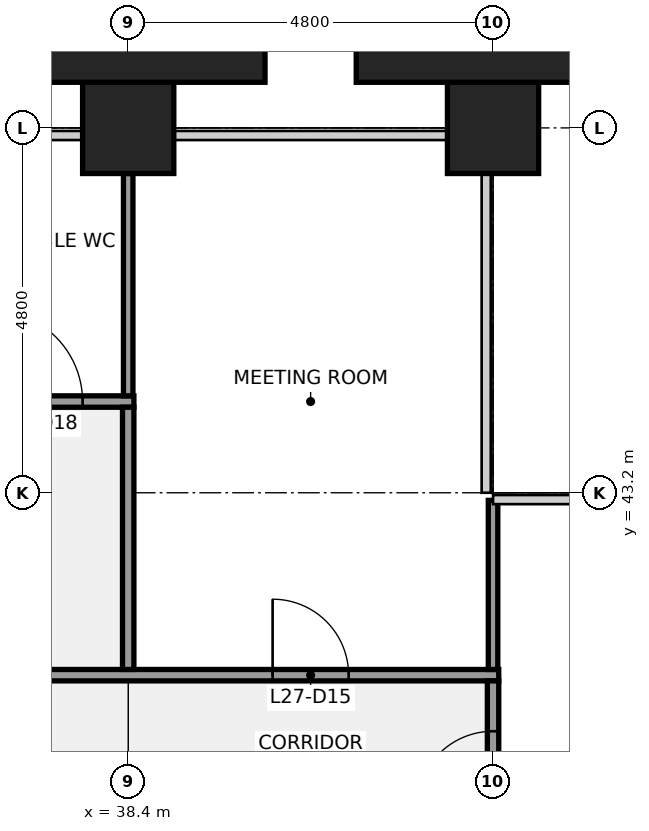
"""IFC4 building model, lengths in metres.
Left out: names, types, materials, properties, quantities, classifications, styles, units other than length and angle.
Written with IfcOpenShell. Run it as: python <this file> out.ifc"""

import sys

from ifc_helpers import new_model, si_unit, direction, frame, frame_2d, origin, origin_2d, place, context, subcontext, project, spatial, rectangle, extrude, element, fill, save


model = new_model("IFC4")
c1 = context("Model", 3, precision=1e-05, world=origin(), true_north=direction((0.0, 1.0)))
c2 = subcontext(c1, "Body", "Model", "MODEL_VIEW")
j1 = project(units=[si_unit("LENGTHUNIT", "METRE"), si_unit("PLANEANGLEUNIT", "RADIAN")], contexts=[c1])
p1 = place(None, origin())
s1 = spatial("IfcSite", under=j1, at=p1, CompositionType="ELEMENT")
p2 = place(p1, origin())
s2 = spatial("IfcBuilding", under=s1, at=p2, CompositionType="ELEMENT")
p3 = place(p2, frame((0.0, 0.0, 128.1)))
s3 = spatial("IfcBuildingStorey", under=s2, at=p3, CompositionType="ELEMENT", Elevation=128.1)
for number, where, z_axis, x_axis in (
    (1, (38.4, 48.0, 0.0), (0.0, 0.0, 1.0), (1.0, 0.0, 0.0)),
    (2, (43.2, 48.0, 0.0), (0.0, 0.0, 1.0), (1.0, 0.0, 0.0)),
):
    element("IfcColumn", number, at=place(p3, frame(where, z_axis=z_axis, x_axis=x_axis)), inside=s3, PredefinedType="COLUMN", context=c2, shape_type="SweptSolid", body=[
        extrude(rectangle(XDim=1.2, YDim=1.2, at=origin_2d()), origin(), (0.0, 0.0, 1.0), 4.0),
    ])
p4 = place(p3, frame((14.325, 40.8, 0.0), z_axis=(0.0, 0.0, 1.0), x_axis=(1.0, 0.0, 0.0)))
e3 = element("IfcWall", 3, at=p4, inside=s3, PredefinedType="PARTITIONING", context=c2, shape_type="SweptSolid", body=[
    extrude(rectangle(XDim=28.95, YDim=0.15, at=frame_2d((14.475, 0.0))), origin(), (0.0, 0.0, 1.0), 2.936),
])
p5 = place(p4, frame((1.975, 0.0, 0.0)))
e4 = element("IfcOpeningElement", 4, at=p5, cuts=e3, PredefinedType="OPENING", context=c2, shape_type="SweptSolid", body=[
    extrude(rectangle(XDim=1.0, YDim=2.1, at=frame_2d((0.5, 1.05))), frame((0.0, 0.085, 0.0), z_axis=(0.0, -1.0, 0.0), x_axis=(1.0, 0.0, 0.0)), (0.0, 0.0, 1.0), 0.17),
])
p6 = place(p4, frame((5.575, 0.0, 0.0)))
e5 = element("IfcOpeningElement", 5, at=p6, cuts=e3, PredefinedType="OPENING", context=c2, shape_type="SweptSolid", body=[
    extrude(rectangle(XDim=1.0, YDim=2.1, at=frame_2d((0.5, 1.05))), frame((0.0, 0.085, 0.0), z_axis=(0.0, -1.0, 0.0), x_axis=(1.0, 0.0, 0.0)), (0.0, 0.0, 1.0), 0.17),
])
p7 = place(p4, frame((9.175, 0.0, 0.0)))
e6 = element("IfcOpeningElement", 6, at=p7, cuts=e3, PredefinedType="OPENING", context=c2, shape_type="SweptSolid", body=[
    extrude(rectangle(XDim=1.0, YDim=2.1, at=frame_2d((0.5, 1.05))), frame((0.0, 0.085, 0.0), z_axis=(0.0, -1.0, 0.0), x_axis=(1.0, 0.0, 0.0)), (0.0, 0.0, 1.0), 0.17),
])
p8 = place(p4, frame((12.775, 0.0, 0.0)))
e7 = element("IfcOpeningElement", 7, at=p8, cuts=e3, PredefinedType="OPENING", context=c2, shape_type="SweptSolid", body=[
    extrude(rectangle(XDim=1.0, YDim=2.1, at=frame_2d((0.5, 1.05))), frame((0.0, 0.085, 0.0), z_axis=(0.0, -1.0, 0.0), x_axis=(1.0, 0.0, 0.0)), (0.0, 0.0, 1.0), 0.17),
])
p9 = place(p4, frame((15.175, 0.0, 0.0)))
e8 = element("IfcOpeningElement", 8, at=p9, cuts=e3, PredefinedType="OPENING", context=c2, shape_type="SweptSolid", body=[
    extrude(rectangle(XDim=1.0, YDim=2.1, at=frame_2d((0.5, 1.05))), frame((0.0, 0.085, 0.0), z_axis=(0.0, -1.0, 0.0), x_axis=(1.0, 0.0, 0.0)), (0.0, 0.0, 1.0), 0.17),
])
p10 = place(p4, frame((19.975, 0.0, 0.0)))
e9 = element("IfcOpeningElement", 9, at=p10, cuts=e3, PredefinedType="OPENING", context=c2, shape_type="SweptSolid", body=[
    extrude(rectangle(XDim=1.0, YDim=2.1, at=frame_2d((0.5, 1.05))), frame((0.0, 0.085, 0.0), z_axis=(0.0, -1.0, 0.0), x_axis=(1.0, 0.0, 0.0)), (0.0, 0.0, 1.0), 0.17),
])
p11 = place(p4, frame((25.975, 0.0, 0.0)))
e10 = element("IfcOpeningElement", 10, at=p11, cuts=e3, PredefinedType="OPENING", context=c2, shape_type="SweptSolid", body=[
    extrude(rectangle(XDim=1.0, YDim=2.1, at=frame_2d((0.5, 1.05))), frame((0.0, 0.085, 0.0), z_axis=(0.0, -1.0, 0.0), x_axis=(1.0, 0.0, 0.0)), (0.0, 0.0, 1.0), 0.17),
])
p12 = place(p3, frame((31.125, 44.4, 0.0), z_axis=(0.0, 0.0, 1.0), x_axis=(1.0, 0.0, 0.0)))
e11 = element("IfcWall", 11, at=p12, inside=s3, PredefinedType="PARTITIONING", context=c2, shape_type="SweptSolid", body=[
    extrude(rectangle(XDim=7.35, YDim=0.15, at=frame_2d((3.675, 0.0))), origin(), (0.0, 0.0, 1.0), 2.936),
])
p13 = place(p12, frame((0.825, 0.0, 0.0)))
e12 = element("IfcOpeningElement", 12, at=p13, cuts=e11, PredefinedType="OPENING", context=c2, shape_type="SweptSolid", body=[
    extrude(rectangle(XDim=0.9, YDim=2.1, at=frame_2d((0.45, 1.05))), frame((0.0, 0.085, 0.0), z_axis=(0.0, -1.0, 0.0), x_axis=(1.0, 0.0, 0.0)), (0.0, 0.0, 1.0), 0.17),
])
p14 = place(p12, frame((3.225, 0.0, 0.0)))
e13 = element("IfcOpeningElement", 13, at=p14, cuts=e11, PredefinedType="OPENING", context=c2, shape_type="SweptSolid", body=[
    extrude(rectangle(XDim=0.9, YDim=2.1, at=frame_2d((0.45, 1.05))), frame((0.0, 0.085, 0.0), z_axis=(0.0, -1.0, 0.0), x_axis=(1.0, 0.0, 0.0)), (0.0, 0.0, 1.0), 0.17),
])
p15 = place(p12, frame((5.475, 0.0, 0.0)))
e14 = element("IfcOpeningElement", 14, at=p15, cuts=e11, PredefinedType="OPENING", context=c2, shape_type="SweptSolid", body=[
    extrude(rectangle(XDim=1.2, YDim=2.1, at=frame_2d((0.6, 1.05))), frame((0.0, 0.085, 0.0), z_axis=(0.0, -1.0, 0.0), x_axis=(1.0, 0.0, 0.0)), (0.0, 0.0, 1.0), 0.17),
])
p16 = place(p3, frame((38.4, 44.475, 0.0), z_axis=(0.0, 0.0, 1.0), x_axis=(0.0, 1.0, 0.0)))
e15 = element("IfcWall", 15, at=p16, inside=s3, PredefinedType="PARTITIONING", context=c2, shape_type="SweptSolid", body=[
    extrude(rectangle(XDim=2.925, YDim=0.125, at=frame_2d((1.462, 0.0))), origin(), (0.0, 0.0, 1.0), 2.936),
])
p17 = place(p3, frame((38.4, 40.875, 0.0), z_axis=(0.0, 0.0, 1.0), x_axis=(0.0, 1.0, 0.0)))
e16 = element("IfcWall", 16, at=p17, inside=s3, PredefinedType="PARTITIONING", context=c2, shape_type="SweptSolid", body=[
    extrude(rectangle(XDim=3.45, YDim=0.15, at=frame_2d((1.725, 0.0))), origin(), (0.0, 0.0, 1.0), 2.936),
])
p18 = place(p3, frame((43.2, 40.875, 0.0), z_axis=(0.0, 0.0, 1.0), x_axis=(0.0, 1.0, 0.0)))
e17 = element("IfcWall", 17, at=p18, inside=s3, PredefinedType="PARTITIONING", context=c2, shape_type="SweptSolid", body=[
    extrude(rectangle(XDim=2.225, YDim=0.125, at=frame_2d((1.113, 0.0))), origin(), (0.0, 0.0, 1.0), 2.936),
])
p19 = place(p3, frame((43.2, 38.4, 0.0), z_axis=(0.0, 0.0, 1.0), x_axis=(0.0, 1.0, 0.0)))
e18 = element("IfcWall", 18, at=p19, inside=s3, PredefinedType="PARTITIONING", context=c2, shape_type="SweptSolid", body=[
    extrude(rectangle(XDim=2.325, YDim=0.15, at=frame_2d((1.163, 0.0))), origin(), (0.0, 0.0, 1.0), 2.936),
])
p20 = place(p19, frame((0.663, 0.0, 0.0)))
e19 = element("IfcOpeningElement", 19, at=p20, cuts=e18, PredefinedType="OPENING", context=c2, shape_type="SweptSolid", body=[
    extrude(rectangle(XDim=1.0, YDim=2.1, at=frame_2d((0.5, 1.05))), frame((0.0, 0.085, 0.0), z_axis=(0.0, -1.0, 0.0), x_axis=(1.0, 0.0, 0.0)), (0.0, 0.0, 1.0), 0.17),
])
for number, where, z_axis, x_axis in (
    (20, (38.4, 49.05, 0.0), (0.0, 0.0, 1.0), (1.0, 0.0, 0.0)),
    (21, (43.2, 49.05, 0.0), (0.0, 0.0, 1.0), (1.0, 0.0, 0.0)),
):
    element("IfcColumn", number, at=place(p3, frame(where, z_axis=z_axis, x_axis=x_axis)), inside=s3, PredefinedType="PILASTER", context=c2, shape_type="SweptSolid", body=[
        extrude(rectangle(XDim=3.6, YDim=0.9, at=origin_2d()), origin(), (0.0, 0.0, 1.0), 4.0),
    ])
p21 = place(p11, origin())
e22 = element("IfcDoor", 22, at=p21, inside=s3, OperationType="SINGLE_SWING_LEFT", PredefinedType="DOOR", context=c2, shape_type="SweptSolid", body=[
    extrude(rectangle(XDim=1.0, YDim=2.1, at=frame_2d((0.5, 1.05))), frame((0.0, 0.025, 0.0), z_axis=(0.0, -1.0, 0.0), x_axis=(1.0, 0.0, 0.0)), (0.0, 0.0, 1.0), 0.05),
])
fill(e10, e22)
p22 = place(p15, origin())
e23 = element("IfcDoor", 23, at=p22, inside=s3, OperationType="SINGLE_SWING_LEFT", PredefinedType="DOOR", context=c2, shape_type="SweptSolid", body=[
    extrude(rectangle(XDim=1.2, YDim=2.1, at=frame_2d((0.6, 1.05))), frame((0.0, 0.025, 0.0), z_axis=(0.0, -1.0, 0.0), x_axis=(1.0, 0.0, 0.0)), (0.0, 0.0, 1.0), 0.05),
])
fill(e14, e23)
p23 = place(p20, origin())
e24 = element("IfcDoor", 24, at=p23, inside=s3, OperationType="SINGLE_SWING_LEFT", PredefinedType="DOOR", context=c2, shape_type="SweptSolid", body=[
    extrude(rectangle(XDim=1.0, YDim=2.1, at=frame_2d((0.5, 1.05))), frame((0.0, 0.025, 0.0), z_axis=(0.0, -1.0, 0.0), x_axis=(1.0, 0.0, 0.0)), (0.0, 0.0, 1.0), 0.05),
])
fill(e19, e24)
save(model, sys.argv[1])
